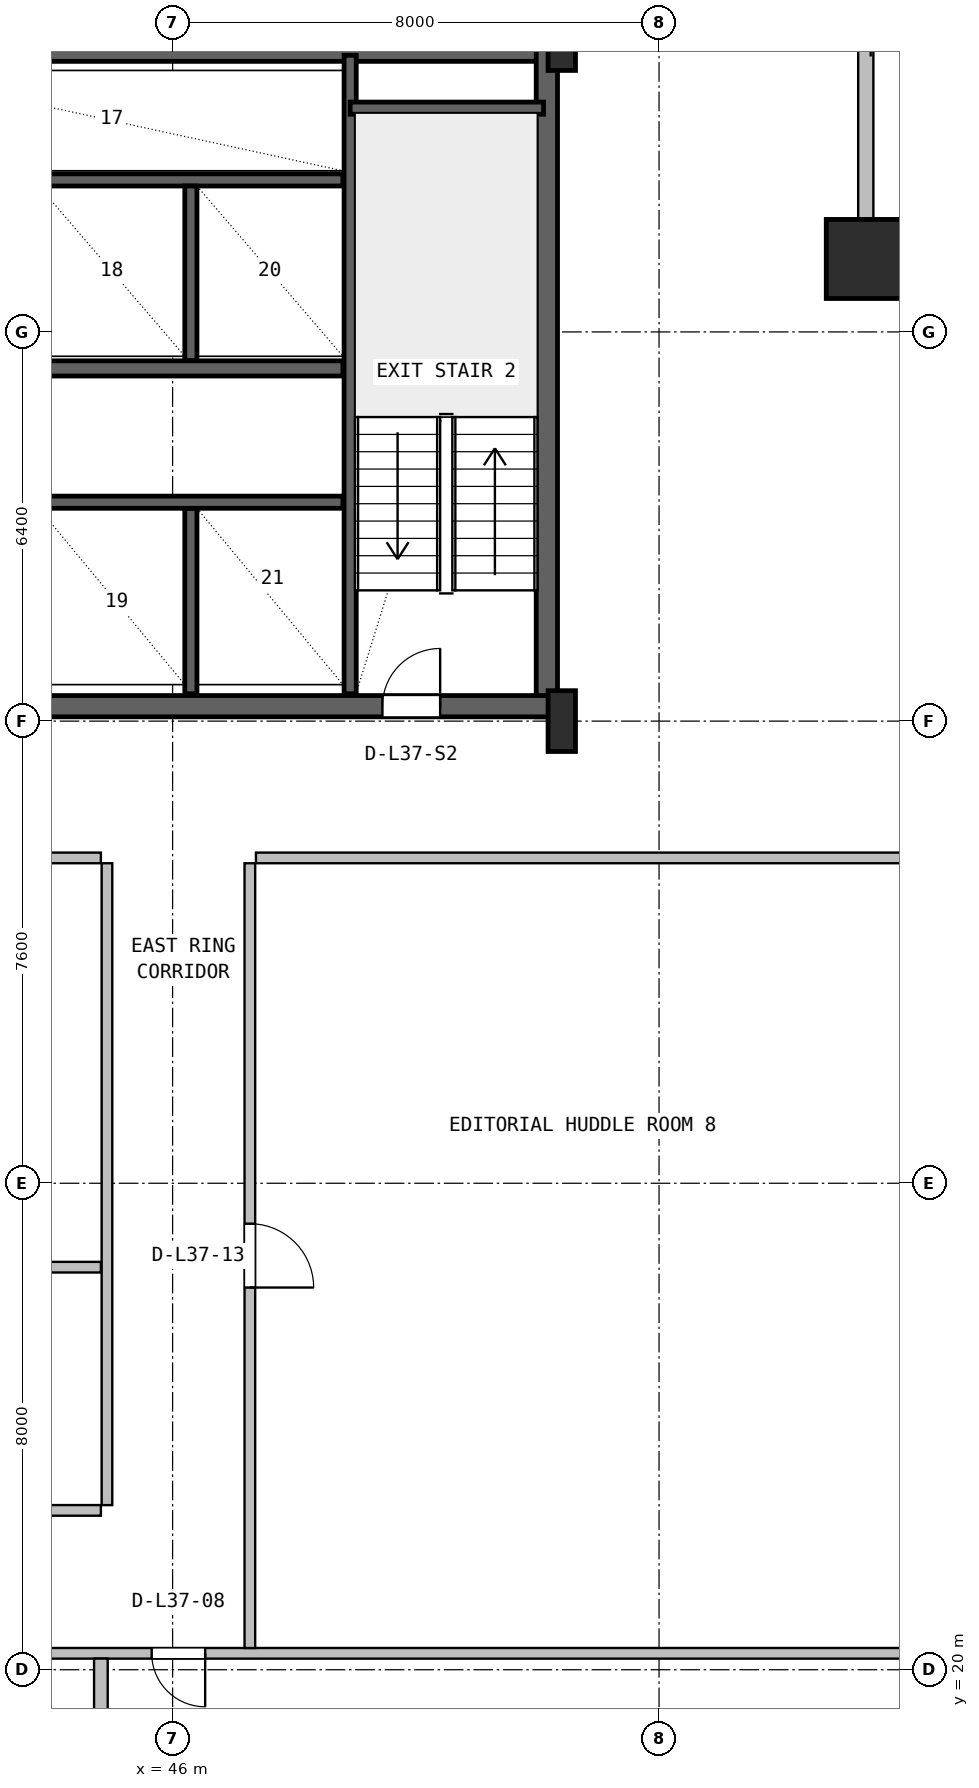
"""IFC4 building model, lengths in metres.
Left out: names, types, materials, properties, quantities, classifications, styles, units other than length and angle.
Written with IfcOpenShell. Run it as: python <this file> out.ifc"""

import sys

from ifc_helpers import new_model, si_unit, direction, frame, frame_2d, origin, origin_2d, place, context, subcontext, project, spatial, rectangle, hollow_rectangle, i_section, extrude, source, transform, mapped, element, fill, save


model = new_model("IFC4")
c1 = context("Model", 3, precision=1e-05, world=origin(), true_north=direction((0.0, 1.0)))
c2 = subcontext(c1, "Body", "Model", "MODEL_VIEW")
j1 = project(units=[si_unit("LENGTHUNIT", "METRE"), si_unit("PLANEANGLEUNIT", "RADIAN")], contexts=[c1])
p1 = place(None, origin())
s1 = spatial("IfcSite", under=j1, at=p1, CompositionType="ELEMENT")
p2 = place(p1, origin())
s2 = spatial("IfcBuilding", under=s1, at=p2, CompositionType="ELEMENT")
p3 = place(p2, frame((0.0, 0.0, 153.4)))
s3 = spatial("IfcBuildingStorey", under=s2, at=p3, CompositionType="ELEMENT", Elevation=153.4)
p4 = place(p3, frame((15.6, 46.625, 0.0), z_axis=(0.0, 0.0, 1.0), x_axis=(1.0, 0.0, 0.0)))
e1 = element("IfcWall", 1, at=p4, inside=s3, PredefinedType="SHEAR", context=c2, shape_type="SweptSolid", body=[
    extrude(rectangle(XDim=36.8, YDim=0.35, at=frame_2d((18.4, 0.0))), origin(), (0.0, 0.0, 1.0), 3.55),
])
p5 = place(p3, frame((52.155, 35.67, 0.0), z_axis=(0.0, 0.0, 1.0), x_axis=(0.0, 1.0, 0.0)))
e2 = element("IfcWall", 2, at=p5, inside=s3, PredefinedType="SHEAR", context=c2, shape_type="SweptSolid", body=[
    extrude(rectangle(XDim=11.13, YDim=0.35, at=frame_2d((5.565, 0.0))), origin(), (0.0, 0.0, 1.0), 3.55),
])
p6 = place(p3, frame((43.2, 35.845, 0.0), z_axis=(0.0, 0.0, 1.0), x_axis=(1.0, 0.0, 0.0)))
e3 = element("IfcWall", 3, at=p6, inside=s3, PredefinedType="SHEAR", context=c2, shape_type="SweptSolid", body=[
    extrude(rectangle(XDim=9.13, YDim=0.35, at=frame_2d((4.565, 0.0))), origin(), (0.0, 0.0, 1.0), 3.55),
])
p7 = place(p6, frame((6.25, 0.0, 0.0)))
e4 = element("IfcOpeningElement", 4, at=p7, cuts=e3, PredefinedType="OPENING", context=c2, shape_type="SweptSolid", body=[
    extrude(rectangle(XDim=0.95, YDim=2.1, at=frame_2d((0.475, 1.05))), frame((0.0, 0.185, 0.0), z_axis=(0.0, -1.0, 0.0), x_axis=(1.0, 0.0, 0.0)), (0.0, 0.0, 1.0), 0.37),
])
m1 = source(origin(), c2, "Body", "SweptSolid", [
    extrude(i_section(OverallWidth=0.45, OverallDepth=1.0, WebThickness=0.016, FlangeThickness=0.03, FilletRadius=0.016, at=origin_2d()), origin(), (0.0, 0.0, 1.0), 3.8),
])
for number, where, z_axis, x_axis in (
    (5, (52.4, 35.6, 0.0), (0.0, 0.0, 1.0), (1.0, 0.0, 0.0)),
    (6, (52.4, 46.8, 0.0), (0.0, 0.0, 1.0), (1.0, 0.0, 0.0)),
):
    element("IfcColumn", number, at=place(p3, frame(where, z_axis=z_axis, x_axis=x_axis)), inside=s3, PredefinedType="COLUMN", context=c2, shape_type="MappedRepresentation", body=[
        mapped(m1, transform((0.0, 0.0, 0.0), x_axis=(1.0, 0.0, 0.0), y_axis=(0.0, 1.0, 0.0), z_axis=(0.0, 0.0, 1.0), scale=1.0)),
    ])
m2 = source(origin(), c2, "Body", "SweptSolid", [
    extrude(hollow_rectangle(XDim=1.3, YDim=1.3, WallThickness=0.05, at=origin_2d()), origin(), (0.0, 0.0, 1.0), 3.8),
])
p8 = place(p3, frame((57.4, 43.2, 0.0), z_axis=(0.0, 0.0, 1.0), x_axis=(1.0, 0.0, 0.0)))
e7 = element("IfcColumn", 7, at=p8, inside=s3, PredefinedType="COLUMN", context=c2, shape_type="MappedRepresentation", body=[
    mapped(m2, transform((0.0, 0.0, 0.0), x_axis=(1.0, 0.0, 0.0), y_axis=(0.0, 1.0, 0.0), z_axis=(0.0, 0.0, 1.0), scale=1.0)),
])
p9 = place(p3, frame((57.53, 43.2, 0.0), z_axis=(0.0, 0.0, 1.0), x_axis=(1.0, 0.0, 0.0)))
e8 = element("IfcWall", 8, at=p9, inside=s3, PredefinedType="SOLIDWALL", context=c2, shape_type="SweptSolid", body=[
    extrude(rectangle(XDim=3.39, YDim=0.25, at=frame_2d((1.695, 0.0))), origin(), (0.0, 0.0, 1.0), 3.53),
])
p10 = place(p3, frame((57.4, 43.12, 0.0), z_axis=(0.0, 0.0, 1.0), x_axis=(0.0, 1.0, 0.0)))
e9 = element("IfcWall", 9, at=p10, inside=s3, PredefinedType="SOLIDWALL", context=c2, shape_type="SweptSolid", body=[
    extrude(rectangle(XDim=3.6, YDim=0.25, at=frame_2d((1.8, 0.0))), origin(), (0.0, 0.0, 1.0), 3.108),
])
p11 = place(p3, frame((48.92, 36.05, 0.0), z_axis=(0.0, 0.0, 1.0), x_axis=(0.0, 1.0, 0.0)))
e10 = element("IfcWall", 10, at=p11, inside=s3, PredefinedType="SHEAR", context=c2, shape_type="SweptSolid", body=[
    extrude(rectangle(XDim=10.5, YDim=0.2, at=frame_2d((5.25, 0.0))), origin(), (0.0, 0.0, 1.0), 3.55),
])
p12 = place(p3, frame((48.92, 45.68, 0.0), z_axis=(0.0, 0.0, 1.0), x_axis=(1.0, 0.0, 0.0)))
e11 = element("IfcWall", 11, at=p12, inside=s3, PredefinedType="SHEAR", context=c2, shape_type="SweptSolid", body=[
    extrude(rectangle(XDim=3.18, YDim=0.2, at=frame_2d((1.59, 0.0))), origin(), (0.0, 0.0, 1.0), 3.55),
])
p13 = place(p3, frame((24.98, 41.4, 0.0), z_axis=(0.0, 0.0, 1.0), x_axis=(1.0, 0.0, 0.0)))
e12 = element("IfcWall", 12, at=p13, inside=s3, PredefinedType="SHEAR", context=c2, shape_type="SweptSolid", body=[
    extrude(rectangle(XDim=23.82, YDim=0.25, at=frame_2d((11.91, 0.0))), origin(), (0.0, 0.0, 1.0), 3.55),
])
p14 = place(p13, frame((8.87, 0.0, 0.0)))
e13 = element("IfcOpeningElement", 13, at=p14, cuts=e12, PredefinedType="OPENING", context=c2, shape_type="SweptSolid", body=[
    extrude(rectangle(XDim=1.1, YDim=2.18, at=frame_2d((0.55, 1.09))), frame((0.0, 0.135, 0.0), z_axis=(0.0, -1.0, 0.0), x_axis=(1.0, 0.0, 0.0)), (0.0, 0.0, 1.0), 0.27),
])
p15 = place(p13, frame((11.47, 0.0, 0.0)))
e14 = element("IfcOpeningElement", 14, at=p15, cuts=e12, PredefinedType="OPENING", context=c2, shape_type="SweptSolid", body=[
    extrude(rectangle(XDim=1.1, YDim=2.18, at=frame_2d((0.55, 1.09))), frame((0.0, 0.135, 0.0), z_axis=(0.0, -1.0, 0.0), x_axis=(1.0, 0.0, 0.0)), (0.0, 0.0, 1.0), 0.27),
])
p16 = place(p13, frame((14.07, 0.0, 0.0)))
e15 = element("IfcOpeningElement", 15, at=p16, cuts=e12, PredefinedType="OPENING", context=c2, shape_type="SweptSolid", body=[
    extrude(rectangle(XDim=1.1, YDim=2.18, at=frame_2d((0.55, 1.09))), frame((0.0, 0.135, 0.0), z_axis=(0.0, -1.0, 0.0), x_axis=(1.0, 0.0, 0.0)), (0.0, 0.0, 1.0), 0.27),
])
p17 = place(p13, frame((0.96, 0.0, 0.0)))
e16 = element("IfcOpeningElement", 16, at=p17, cuts=e12, PredefinedType="OPENING", context=c2, shape_type="SweptSolid", body=[
    extrude(rectangle(XDim=1.0, YDim=2.08, at=frame_2d((0.5, 1.04))), frame((0.0, 0.135, 0.0), z_axis=(0.0, -1.0, 0.0), x_axis=(1.0, 0.0, 0.0)), (0.0, 0.0, 1.0), 0.27),
])
p18 = place(p13, frame((3.56, 0.0, 0.0)))
e17 = element("IfcOpeningElement", 17, at=p18, cuts=e12, PredefinedType="OPENING", context=c2, shape_type="SweptSolid", body=[
    extrude(rectangle(XDim=1.0, YDim=2.08, at=frame_2d((0.5, 1.04))), frame((0.0, 0.135, 0.0), z_axis=(0.0, -1.0, 0.0), x_axis=(1.0, 0.0, 0.0)), (0.0, 0.0, 1.0), 0.27),
])
p19 = place(p13, frame((6.16, 0.0, 0.0)))
e18 = element("IfcOpeningElement", 18, at=p19, cuts=e12, PredefinedType="OPENING", context=c2, shape_type="SweptSolid", body=[
    extrude(rectangle(XDim=0.92, YDim=2.08, at=frame_2d((0.46, 1.04))), frame((0.0, 0.135, 0.0), z_axis=(0.0, -1.0, 0.0), x_axis=(1.0, 0.0, 0.0)), (0.0, 0.0, 1.0), 0.27),
])
p20 = place(p3, frame((41.22, 44.5, 0.0), z_axis=(0.0, 0.0, 1.0), x_axis=(1.0, 0.0, 0.0)))
e19 = element("IfcWall", 19, at=p20, inside=s3, PredefinedType="SHEAR", context=c2, shape_type="SweptSolid", body=[
    extrude(rectangle(XDim=7.58, YDim=0.2, at=frame_2d((3.79, 0.0))), origin(), (0.0, 0.0, 1.0), 3.55),
])
p21 = place(p3, frame((46.3, 41.53, 0.0), z_axis=(0.0, 0.0, 1.0), x_axis=(0.0, 1.0, 0.0)))
e20 = element("IfcWall", 20, at=p21, inside=s3, PredefinedType="SHEAR", context=c2, shape_type="SweptSolid", body=[
    extrude(rectangle(XDim=2.87, YDim=0.2, at=frame_2d((1.435, 0.0))), origin(), (0.0, 0.0, 1.0), 3.55),
])
p22 = place(p3, frame((46.3, 36.05, 0.0), z_axis=(0.0, 0.0, 1.0), x_axis=(0.0, 1.0, 0.0)))
e21 = element("IfcWall", 21, at=p22, inside=s3, PredefinedType="SHEAR", context=c2, shape_type="SweptSolid", body=[
    extrude(rectangle(XDim=3.05, YDim=0.2, at=frame_2d((1.525, 0.0))), origin(), (0.0, 0.0, 1.0), 3.55),
])
p23 = place(p3, frame((43.65, 39.2, 0.0), z_axis=(0.0, 0.0, 1.0), x_axis=(1.0, 0.0, 0.0)))
e22 = element("IfcWall", 22, at=p23, inside=s3, PredefinedType="SHEAR", context=c2, shape_type="SweptSolid", body=[
    extrude(rectangle(XDim=5.15, YDim=0.2, at=frame_2d((2.575, 0.0))), origin(), (0.0, 0.0, 1.0), 3.55),
])
p24 = place(p3, frame((7.18, 20.27, 0.0), z_axis=(0.0, 0.0, 1.0), x_axis=(1.0, 0.0, 0.0)))
e23 = element("IfcWall", 23, at=p24, inside=s3, PredefinedType="PARTITIONING", context=c2, shape_type="SweptSolid", body=[
    extrude(rectangle(XDim=53.64, YDim=0.175, at=frame_2d((26.82, 0.0))), origin(), (0.0, 0.0, 1.0), 2.909),
])
p25 = place(p24, frame((13.55, 0.0, 0.0)))
e24 = element("IfcOpeningElement", 24, at=p25, cuts=e23, PredefinedType="OPENING", context=c2, shape_type="SweptSolid", body=[
    extrude(rectangle(XDim=1.05, YDim=2.1, at=frame_2d((0.525, 1.05))), frame((0.0, 0.098, 0.0), z_axis=(0.0, -1.0, 0.0), x_axis=(1.0, 0.0, 0.0)), (0.0, 0.0, 1.0), 0.195),
])
p26 = place(p24, frame((25.795, 0.0, 0.0)))
e25 = element("IfcOpeningElement", 25, at=p26, cuts=e23, PredefinedType="OPENING", context=c2, shape_type="SweptSolid", body=[
    extrude(rectangle(XDim=1.4, YDim=2.12, at=frame_2d((0.7, 1.06))), frame((0.0, 0.098, 0.0), z_axis=(0.0, -1.0, 0.0), x_axis=(1.0, 0.0, 0.0)), (0.0, 0.0, 1.0), 0.195),
])
p27 = place(p24, frame((38.475, 0.0, 0.0)))
e26 = element("IfcOpeningElement", 26, at=p27, cuts=e23, PredefinedType="OPENING", context=c2, shape_type="SweptSolid", body=[
    extrude(rectangle(XDim=0.88, YDim=2.06, at=frame_2d((0.44, 1.03))), frame((0.0, 0.098, 0.0), z_axis=(0.0, -1.0, 0.0), x_axis=(1.0, 0.0, 0.0)), (0.0, 0.0, 1.0), 0.195),
])
p28 = place(p3, frame((44.82, 7.38, 0.0), z_axis=(0.0, 0.0, 1.0), x_axis=(0.0, 1.0, 0.0)))
e27 = element("IfcWall", 27, at=p28, inside=s3, PredefinedType="PARTITIONING", context=c2, shape_type="SweptSolid", body=[
    extrude(rectangle(XDim=12.803, YDim=0.225, at=frame_2d((6.402, 0.0))), origin(), (0.0, 0.0, 1.0), 3.108),
])
p29 = place(p3, frame((22.53, 22.62, 0.0), z_axis=(0.0, 0.0, 1.0), x_axis=(1.0, 0.0, 0.0)))
e28 = element("IfcWall", 28, at=p29, inside=s3, PredefinedType="PARTITIONING", context=c2, shape_type="SweptSolid", body=[
    extrude(rectangle(XDim=22.29, YDim=0.175, at=frame_2d((11.145, 0.0))), origin(), (0.0, 0.0, 1.0), 2.909),
])
p30 = place(p29, frame((10.62, 0.0, 0.0)))
e29 = element("IfcOpeningElement", 29, at=p30, cuts=e28, PredefinedType="OPENING", context=c2, shape_type="SweptSolid", body=[
    extrude(rectangle(XDim=1.05, YDim=2.1, at=frame_2d((0.525, 1.05))), frame((0.0, 0.098, 0.0), z_axis=(0.0, -1.0, 0.0), x_axis=(1.0, 0.0, 0.0)), (0.0, 0.0, 1.0), 0.195),
])
p31 = place(p3, frame((44.92, 22.707, 0.0), z_axis=(0.0, 0.0, 1.0), x_axis=(0.0, 1.0, 0.0)))
e30 = element("IfcWall", 30, at=p31, inside=s3, PredefinedType="PARTITIONING", context=c2, shape_type="SweptSolid", body=[
    extrude(rectangle(XDim=10.556, YDim=0.175, at=frame_2d((5.278, 0.0))), origin(), (0.0, 0.0, 1.0), 3.222),
])
p32 = place(p3, frame((22.53, 26.62, 0.0), z_axis=(0.0, 0.0, 1.0), x_axis=(1.0, 0.0, 0.0)))
e31 = element("IfcWall", 31, at=p32, inside=s3, PredefinedType="PARTITIONING", context=c2, shape_type="SweptSolid", body=[
    extrude(rectangle(XDim=22.29, YDim=0.175, at=frame_2d((11.145, 0.0))), origin(), (0.0, 0.0, 1.0), 2.909),
])
p33 = place(p3, frame((22.53, 33.35, 0.0), z_axis=(0.0, 0.0, 1.0), x_axis=(1.0, 0.0, 0.0)))
e32 = element("IfcWall", 32, at=p33, inside=s3, PredefinedType="PARTITIONING", context=c2, shape_type="SweptSolid", body=[
    extrude(rectangle(XDim=22.29, YDim=0.175, at=frame_2d((11.145, 0.0))), origin(), (0.0, 0.0, 1.0), 2.909),
])
p34 = place(p33, frame((10.62, 0.0, 0.0)))
e33 = element("IfcOpeningElement", 33, at=p34, cuts=e32, PredefinedType="OPENING", context=c2, shape_type="SweptSolid", body=[
    extrude(rectangle(XDim=1.05, YDim=2.1, at=frame_2d((0.525, 1.05))), frame((0.0, 0.098, 0.0), z_axis=(0.0, -1.0, 0.0), x_axis=(1.0, 0.0, 0.0)), (0.0, 0.0, 1.0), 0.195),
])
p35 = place(p3, frame((47.37, 33.35, 0.0), z_axis=(0.0, 0.0, 1.0), x_axis=(1.0, 0.0, 0.0)))
e34 = element("IfcWall", 34, at=p35, inside=s3, PredefinedType="PARTITIONING", context=c2, shape_type="SweptSolid", body=[
    extrude(rectangle(XDim=13.45, YDim=0.175, at=frame_2d((6.725, 0.0))), origin(), (0.0, 0.0, 1.0), 3.108),
])
p36 = place(p3, frame((47.27, 20.357, 0.0), z_axis=(0.0, 0.0, 1.0), x_axis=(0.0, 1.0, 0.0)))
e35 = element("IfcWall", 35, at=p36, inside=s3, PredefinedType="PARTITIONING", context=c2, shape_type="SweptSolid", body=[
    extrude(rectangle(XDim=12.906, YDim=0.175, at=frame_2d((6.453, 0.0))), origin(), (0.0, 0.0, 1.0), 3.222),
])
p37 = place(p36, frame((5.928, 0.0, 0.0)))
e36 = element("IfcOpeningElement", 36, at=p37, cuts=e35, PredefinedType="OPENING", context=c2, shape_type="SweptSolid", body=[
    extrude(rectangle(XDim=1.05, YDim=2.1, at=frame_2d((0.525, 1.05))), frame((0.0, 0.098, 0.0), z_axis=(0.0, -1.0, 0.0), x_axis=(1.0, 0.0, 0.0)), (0.0, 0.0, 1.0), 0.195),
])
m3 = source(origin(), c2, "Body", "SweptSolid", [
    extrude(rectangle(XDim=0.95, YDim=2.1, at=frame_2d((0.475, 1.05))), frame((0.0, 0.025, 0.0), z_axis=(0.0, -1.0, 0.0), x_axis=(1.0, 0.0, 0.0)), (0.0, 0.0, 1.0), 0.05),
])
p38 = place(p7, origin())
e37 = element("IfcDoor", 37, at=p38, inside=s3, OperationType="SINGLE_SWING_RIGHT", PredefinedType="DOOR", context=c2, shape_type="MappedRepresentation", body=[
    mapped(m3, transform((0.0, 0.0, 0.0), x_axis=(1.0, 0.0, 0.0), y_axis=(0.0, 1.0, 0.0), z_axis=(0.0, 0.0, 1.0), scale=1.0)),
])
fill(e4, e37)
m4 = source(origin(), c2, "Body", "SweptSolid", [
    extrude(rectangle(XDim=0.88, YDim=2.06, at=frame_2d((0.44, 1.03))), frame((0.0, 0.025, 0.0), z_axis=(0.0, -1.0, 0.0), x_axis=(1.0, 0.0, 0.0)), (0.0, 0.0, 1.0), 0.05),
])
p39 = place(p27, frame((0.88, 0.0, 0.0), z_axis=(0.0, 0.0, 1.0), x_axis=(-1.0, 0.0, 0.0)))
e38 = element("IfcDoor", 38, at=p39, inside=s3, OperationType="SINGLE_SWING_RIGHT", PredefinedType="DOOR", context=c2, shape_type="MappedRepresentation", body=[
    mapped(m4, transform((0.0, 0.0, 0.0), x_axis=(1.0, 0.0, 0.0), y_axis=(0.0, 1.0, 0.0), z_axis=(0.0, 0.0, 1.0), scale=1.0)),
])
fill(e26, e38)
m5 = source(origin(), c2, "Body", "SweptSolid", [
    extrude(rectangle(XDim=1.05, YDim=2.1, at=frame_2d((0.525, 1.05))), frame((0.0, 0.025, 0.0), z_axis=(0.0, -1.0, 0.0), x_axis=(1.0, 0.0, 0.0)), (0.0, 0.0, 1.0), 0.05),
])
p40 = place(p37, frame((1.05, 0.0, 0.0), z_axis=(0.0, 0.0, 1.0), x_axis=(-1.0, 0.0, 0.0)))
e39 = element("IfcDoor", 39, at=p40, inside=s3, OperationType="SINGLE_SWING_LEFT", PredefinedType="DOOR", context=c2, shape_type="MappedRepresentation", body=[
    mapped(m5, transform((0.0, 0.0, 0.0), x_axis=(1.0, 0.0, 0.0), y_axis=(0.0, 1.0, 0.0), z_axis=(0.0, 0.0, 1.0), scale=1.0)),
])
fill(e36, e39)
save(model, sys.argv[1])
